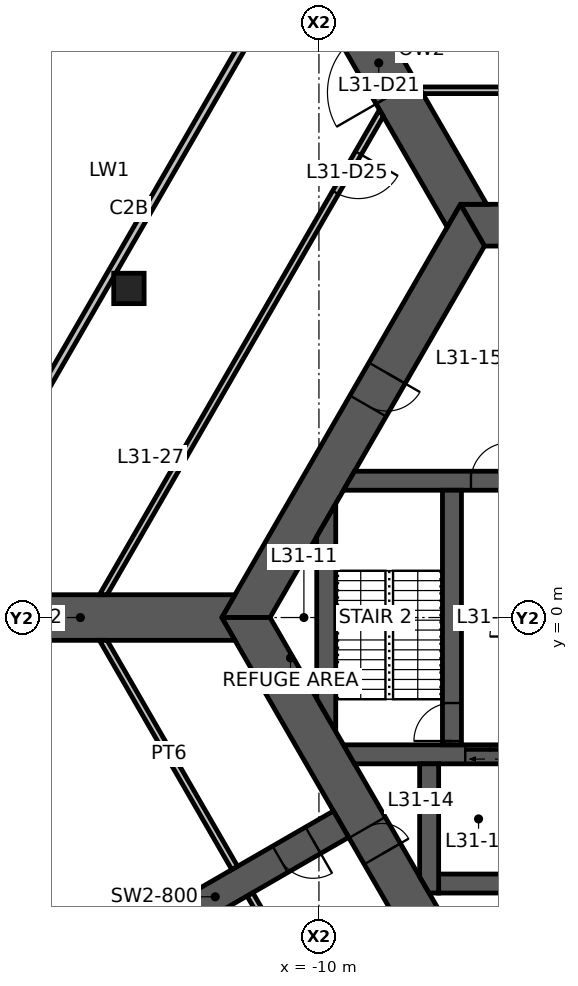
"""IFC4 building model, lengths in metres.
Left out: names, types, materials, properties, quantities, classifications, styles, units other than length and angle.
Written with IfcOpenShell. Run it as: python <this file> out.ifc"""

import sys

from ifc_helpers import new_model, si_unit, direction, frame, frame_2d, origin, origin_2d, place, context, subcontext, project, spatial, polyline, rectangle, hollow_rectangle, outline, extrude, element, fill, save


model = new_model("IFC4")
c1 = context("Model", 3, precision=1e-05, world=origin(), true_north=direction((0.0, 1.0)))
c2 = subcontext(c1, "Body", "Model", "MODEL_VIEW")
j1 = project(units=[si_unit("LENGTHUNIT", "METRE"), si_unit("PLANEANGLEUNIT", "RADIAN")], contexts=[c1])
p1 = place(None, origin())
s1 = spatial("IfcSite", under=j1, at=p1, CompositionType="ELEMENT")
p2 = place(p1, origin())
s2 = spatial("IfcBuilding", under=s1, at=p2, CompositionType="ELEMENT")
p3 = place(p2, frame((0.0, 0.0, 123.6)))
s3 = spatial("IfcBuildingStorey", under=s2, at=p3, CompositionType="ELEMENT", Elevation=123.6)
p4 = place(p3, frame((-15.0, 8.66, 0.0), z_axis=(0.0, 0.0, 1.0), x_axis=(1.0, 0.0, 0.0)))
e1 = element("IfcColumn", 1, at=p4, inside=s3, PredefinedType="COLUMN", context=c2, shape_type="SweptSolid", body=[
    extrude(hollow_rectangle(XDim=0.8, YDim=0.8, WallThickness=0.045, at=origin_2d()), origin(), (0.0, 0.0, 1.0), 5.0),
])
p5 = place(p3, frame((5.961, 10.325, 0.0), z_axis=(0.0, 0.0, 1.0), x_axis=(-1.0, 0.0, 0.0)))
e2 = element("IfcWall", 2, at=p5, inside=s3, PredefinedType="SHEAR", context=c2, shape_type="SweptSolid", body=[
    extrude(outline(polyline([(-0.318, -0.55), (4.636, -0.55), (5.536, -0.55), (6.386, -0.55), (7.286, -0.55), (12.24, -0.55), (11.605, 0.55), (7.286, 0.55), (6.386, 0.55), (5.536, 0.55), (4.636, 0.55), (0.318, 0.55), (-0.318, -0.55)])), origin(), (0.0, 0.0, 1.0), 5.0),
])
p6 = place(p5, frame((6.386, 0.0, 0.0)))
e3 = element("IfcOpeningElement", 3, at=p6, cuts=e2, PredefinedType="OPENING", context=c2, shape_type="SweptSolid", body=[
    extrude(rectangle(XDim=0.9, YDim=2.1, at=frame_2d((0.45, 1.05))), frame((0.0, 0.56, 0.0), z_axis=(0.0, -1.0, 0.0), x_axis=(1.0, 0.0, 0.0)), (0.0, 0.0, 1.0), 1.12),
])
p7 = place(p5, frame((4.636, 0.0, 0.0)))
e4 = element("IfcOpeningElement", 4, at=p7, cuts=e2, PredefinedType="OPENING", context=c2, shape_type="SweptSolid", body=[
    extrude(rectangle(XDim=0.9, YDim=2.1, at=frame_2d((0.45, 1.05))), frame((0.0, 0.56, 0.0), z_axis=(0.0, -1.0, 0.0), x_axis=(1.0, 0.0, 0.0)), (0.0, 0.0, 1.0), 1.12),
])
p8 = place(p3, frame((-5.961, 10.325, 0.0), z_axis=(0.0, 0.0, 1.0), x_axis=(-0.500004296715, -0.866022923061, 0.0)))
e5 = element("IfcWall", 5, at=p8, inside=s3, PredefinedType="SHEAR", context=c2, shape_type="SweptSolid", body=[
    extrude(outline(polyline([(-0.318, -0.55), (4.494, -0.55), (5.494, -0.55), (12.24, -0.55), (11.605, 0.55), (5.494, 0.55), (4.494, 0.55), (0.318, 0.55), (-0.318, -0.55)])), origin(), (0.0, 0.0, 1.0), 5.0),
])
p9 = place(p8, frame((4.494, 0.0, 0.0)))
e6 = element("IfcOpeningElement", 6, at=p9, cuts=e5, PredefinedType="OPENING", context=c2, shape_type="SweptSolid", body=[
    extrude(rectangle(XDim=1.0, YDim=2.1, at=frame_2d((0.5, 1.05))), frame((0.0, 0.56, 0.0), z_axis=(0.0, -1.0, 0.0), x_axis=(1.0, 0.0, 0.0)), (0.0, 0.0, 1.0), 1.12),
])
p10 = place(p3, frame((-11.922, 0.0, 0.0), z_axis=(0.0, 0.0, 1.0), x_axis=(0.500004296715, -0.866022923061, 0.0)))
e7 = element("IfcWall", 7, at=p10, inside=s3, PredefinedType="SHEAR", context=c2, shape_type="SweptSolid", body=[
    extrude(outline(polyline([(-0.318, -0.55), (6.381, -0.55), (7.181, -0.55), (12.24, -0.55), (11.605, 0.55), (7.181, 0.55), (6.381, 0.55), (0.318, 0.55), (-0.318, -0.55)])), origin(), (0.0, 0.0, 1.0), 5.0),
])
p11 = place(p10, frame((6.381, 0.0, 0.0)))
e8 = element("IfcOpeningElement", 8, at=p11, cuts=e7, PredefinedType="OPENING", context=c2, shape_type="SweptSolid", body=[
    extrude(rectangle(XDim=0.8, YDim=2.1, at=frame_2d((0.4, 1.05))), frame((0.0, 0.56, 0.0), z_axis=(0.0, -1.0, 0.0), x_axis=(1.0, 0.0, 0.0)), (0.0, 0.0, 1.0), 1.12),
])
p12 = place(p3, frame((-9.418, -5.438, 0.0), z_axis=(0.0, 0.0, 1.0), x_axis=(-0.866029782078, -0.499992416496, 0.0)))
e9 = element("IfcWall", 9, at=p12, inside=s3, PredefinedType="SHEAR", context=c2, shape_type="SweptSolid", body=[
    extrude(rectangle(XDim=7.646, YDim=0.8, at=frame_2d((3.823, 0.0))), origin(), (0.0, 0.0, 1.0), 5.0),
])
p13 = place(p12, frame((0.85, 0.0, 0.0)))
e10 = element("IfcOpeningElement", 10, at=p13, cuts=e9, PredefinedType="OPENING", context=c2, shape_type="SweptSolid", body=[
    extrude(rectangle(XDim=1.0, YDim=2.1, at=frame_2d((0.5, 1.05))), frame((0.0, 0.41, 0.0), z_axis=(0.0, -1.0, 0.0), x_axis=(1.0, 0.0, 0.0)), (0.0, 0.0, 1.0), 0.82),
])
p14 = place(p3, frame((-6.279, 10.875, -1.15), z_axis=(0.0, 0.0, 1.0), x_axis=(-0.50000923905, 0.866020069551, 0.0)))
e11 = element("IfcWall", 11, at=p14, inside=s3, PredefinedType="SHEAR", context=c2, shape_type="SweptSolid", body=[
    extrude(outline(polyline([(-0.346, -0.6), (3.395, -0.6), (5.195, -0.6), (7.443, -0.6), (7.443, 0.6), (5.195, 0.6), (3.395, 0.6), (-0.346, 0.6), (0.0, 0.0), (-0.346, -0.6)])), origin(), (0.0, 0.0, 1.0), 6.15),
])
p15 = place(p14, frame((3.395, 0.0, 1.15)))
e12 = element("IfcOpeningElement", 12, at=p15, cuts=e11, PredefinedType="OPENING", context=c2, shape_type="SweptSolid", body=[
    extrude(rectangle(XDim=1.8, YDim=2.4, at=frame_2d((0.9, 1.2))), frame((0.0, 0.61, 0.0), z_axis=(0.0, -1.0, 0.0), x_axis=(1.0, 0.0, 0.0)), (0.0, 0.0, 1.0), 1.22),
])
p16 = place(p3, frame((-12.557, 0.0, -1.15), z_axis=(0.0, 0.0, 1.0), x_axis=(-1.0, 0.0, 0.0)))
e13 = element("IfcWall", 13, at=p16, inside=s3, PredefinedType="SHEAR", context=c2, shape_type="SweptSolid", body=[
    extrude(outline(polyline([(-0.346, -0.6), (7.443, -0.6), (7.443, 0.6), (-0.346, 0.6), (0.0, 0.0), (-0.346, -0.6)])), origin(), (0.0, 0.0, 1.0), 6.15),
])
p17 = place(p3, frame((-10.65, 17.395, 0.0), z_axis=(0.0, 0.0, 1.0), x_axis=(-0.499999841607, -0.866025495233, 0.0)))
e14 = element("IfcWall", 14, at=p17, inside=s3, PredefinedType="ELEMENTEDWALL", context=c2, shape_type="SweptSolid", body=[
    extrude(rectangle(XDim=19.479, YDim=0.2, at=frame_2d((9.739, 0.0))), origin(), (0.0, 0.0, 1.0), 5.0),
])
p18 = place(p3, frame((-9.209, 3.6, 0.0), z_axis=(0.0, 0.0, 1.0), x_axis=(1.0, 0.0, 0.0)))
e15 = element("IfcWall", 15, at=p18, inside=s3, PredefinedType="SHEAR", context=c2, shape_type="SweptSolid", body=[
    extrude(outline(polyline([(-0.144, -0.25), (3.209, -0.25), (4.209, -0.25), (7.859, -0.25), (7.859, 0.25), (4.209, 0.25), (3.209, 0.25), (0.144, 0.25), (-0.144, -0.25)])), origin(), (0.0, 0.0, 1.0), 5.0),
])
p19 = place(p18, frame((3.209, 0.0, 0.0)))
e16 = element("IfcOpeningElement", 16, at=p19, cuts=e15, PredefinedType="OPENING", context=c2, shape_type="SweptSolid", body=[
    extrude(rectangle(XDim=1.0, YDim=2.1, at=frame_2d((0.5, 1.05))), frame((0.0, 0.26, 0.0), z_axis=(0.0, -1.0, 0.0), x_axis=(1.0, 0.0, 0.0)), (0.0, 0.0, 1.0), 0.52),
])
p20 = place(p3, frame((-9.209, -3.6, 0.0), z_axis=(0.0, 0.0, 1.0), x_axis=(1.0, 0.0, 0.0)))
e17 = element("IfcWall", 17, at=p20, inside=s3, PredefinedType="SHEAR", context=c2, shape_type="SweptSolid", body=[
    extrude(outline(polyline([(0.144, -0.25), (3.059, -0.25), (4.359, -0.25), (7.859, -0.25), (7.859, 0.25), (4.359, 0.25), (3.059, 0.25), (-0.144, 0.25), (0.144, -0.25)])), origin(), (0.0, 0.0, 1.0), 5.0),
])
p21 = place(p20, frame((3.059, 0.0, 0.0)))
e18 = element("IfcOpeningElement", 18, at=p21, cuts=e17, PredefinedType="OPENING", context=c2, shape_type="SweptSolid", body=[
    extrude(rectangle(XDim=1.3, YDim=2.1, at=frame_2d((0.65, 1.05))), frame((0.0, 0.26, 0.0), z_axis=(0.0, -1.0, 0.0), x_axis=(1.0, 0.0, 0.0)), (0.0, 0.0, 1.0), 0.52),
])
p22 = place(p3, frame((-6.5, -3.35, 0.0), z_axis=(0.0, 0.0, 1.0), x_axis=(0.0, 1.0, 0.0)))
e19 = element("IfcWall", 19, at=p22, inside=s3, PredefinedType="SHEAR", context=c2, shape_type="SweptSolid", body=[
    extrude(rectangle(XDim=6.7, YDim=0.5, at=frame_2d((3.35, 0.0))), origin(), (0.0, 0.0, 1.0), 5.0),
])
p23 = place(p22, frame((0.1, 0.0, 0.0)))
e20 = element("IfcOpeningElement", 20, at=p23, cuts=e19, PredefinedType="OPENING", context=c2, shape_type="SweptSolid", body=[
    extrude(rectangle(XDim=1.0, YDim=2.1, at=frame_2d((0.5, 1.05))), frame((0.0, 0.26, 0.0), z_axis=(0.0, -1.0, 0.0), x_axis=(1.0, 0.0, 0.0)), (0.0, 0.0, 1.0), 0.52),
])
p24 = place(p3, frame((-6.85, -7.0, 0.0), z_axis=(0.0, 0.0, 1.0), x_axis=(1.0, 0.0, 0.0)))
e21 = element("IfcWall", 21, at=p24, inside=s3, PredefinedType="SHEAR", context=c2, shape_type="SweptSolid", body=[
    extrude(rectangle(XDim=2.1, YDim=0.5, at=frame_2d((1.05, 0.0))), origin(), (0.0, 0.0, 1.0), 5.0),
])
p25 = place(p3, frame((-7.1, -3.85, 0.0), z_axis=(0.0, 0.0, 1.0), x_axis=(0.0, -1.0, 0.0)))
e22 = element("IfcWall", 22, at=p25, inside=s3, PredefinedType="SHEAR", context=c2, shape_type="SweptSolid", body=[
    extrude(outline(polyline([(0.0, -0.25), (2.969, -0.25), (3.4, 0.0), (3.4, 0.25), (0.0, 0.25), (0.0, -0.25)])), origin(), (0.0, 0.0, 1.0), 5.0),
])
p26 = place(p3, frame((-9.808, -2.562, 0.0), z_axis=(0.0, 0.0, 1.0), x_axis=(0.0, 1.0, 0.0)))
e23 = element("IfcWall", 23, at=p26, inside=s3, PredefinedType="SHEAR", context=c2, shape_type="SweptSolid", body=[
    extrude(outline(polyline([(-0.433, -0.25), (5.558, -0.25), (4.691, 0.25), (0.433, 0.25), (-0.433, -0.25)])), origin(), (0.0, 0.0, 1.0), 5.0),
])
p27 = place(p3, frame((-0.405, 13.875, 0.0), z_axis=(0.0, 0.0, 1.0), x_axis=(-1.0, 0.0, 0.0)))
e24 = element("IfcWall", 24, at=p27, inside=s3, PredefinedType="PARTITIONING", context=c2, shape_type="SweptSolid", body=[
    extrude(outline(polyline([(0.0, -0.087), (1.9, -0.087), (3.1, -0.087), (6.963, -0.087), (6.862, 0.087), (3.1, 0.087), (1.9, 0.087), (0.0, 0.087), (0.0, -0.087)])), origin(), (0.0, 0.0, 1.0), 4.8),
])
p28 = place(p27, frame((1.9, 0.0, 0.0)))
e25 = element("IfcOpeningElement", 25, at=p28, cuts=e24, PredefinedType="OPENING", context=c2, shape_type="SweptSolid", body=[
    extrude(rectangle(XDim=1.2, YDim=2.1, at=frame_2d((0.6, 1.05))), frame((0.0, 0.098, 0.0), z_axis=(0.0, -1.0, 0.0), x_axis=(1.0, 0.0, 0.0)), (0.0, 0.0, 1.0), 0.195),
])
p29 = place(p3, frame((-8.357, 13.275, 0.0), z_axis=(0.0, 0.0, 1.0), x_axis=(-0.500003545903, -0.866023356546, 0.0)))
e26 = element("IfcWall", 26, at=p29, inside=s3, PredefinedType="PARTITIONING", context=c2, shape_type="SweptSolid", body=[
    extrude(outline(polyline([(-0.051, -0.087), (1.213, -0.087), (2.413, -0.087), (14.686, -0.087), (14.585, 0.087), (2.413, 0.087), (1.213, 0.087), (0.051, 0.087), (-0.051, -0.087)])), origin(), (0.0, 0.0, 1.0), 4.8),
])
p30 = place(p29, frame((1.213, 0.0, 0.0)))
e27 = element("IfcOpeningElement", 27, at=p30, cuts=e26, PredefinedType="OPENING", context=c2, shape_type="SweptSolid", body=[
    extrude(rectangle(XDim=1.2, YDim=2.1, at=frame_2d((0.6, 1.05))), frame((0.0, 0.098, 0.0), z_axis=(0.0, -1.0, 0.0), x_axis=(1.0, 0.0, 0.0)), (0.0, 0.0, 1.0), 0.195),
])
p31 = place(p3, frame((-15.675, -0.6, 0.0), z_axis=(0.0, 0.0, 1.0), x_axis=(0.500005739714, -0.866022089933, 0.0)))
e28 = element("IfcWall", 28, at=p31, inside=s3, PredefinedType="PARTITIONING", context=c2, shape_type="SweptSolid", body=[
    extrude(outline(polyline([(-0.051, -0.087), (6.913, -0.087), (6.913, 0.087), (0.051, 0.087), (-0.051, -0.087)])), origin(), (0.0, 0.0, 1.0), 4.8),
])
p32 = place(p3, frame((-11.814, -7.288, 0.0), z_axis=(0.0, 0.0, 1.0), x_axis=(0.500005739714, -0.866022089933, 0.0)))
e29 = element("IfcWall", 29, at=p32, inside=s3, PredefinedType="PARTITIONING", context=c2, shape_type="SweptSolid", body=[
    extrude(outline(polyline([(0.0, -0.087), (1.9, -0.087), (3.1, -0.087), (6.964, -0.087), (6.863, 0.087), (3.1, 0.087), (1.9, 0.087), (0.0, 0.087), (0.0, -0.087)])), origin(), (0.0, 0.0, 1.0), 4.8),
])
p33 = place(p32, frame((1.9, 0.0, 0.0)))
e30 = element("IfcOpeningElement", 30, at=p33, cuts=e29, PredefinedType="OPENING", context=c2, shape_type="SweptSolid", body=[
    extrude(rectangle(XDim=1.2, YDim=2.1, at=frame_2d((0.6, 1.05))), frame((0.0, 0.098, 0.0), z_axis=(0.0, -1.0, 0.0), x_axis=(1.0, 0.0, 0.0)), (0.0, 0.0, 1.0), 0.195),
])
p34 = place(p11, origin())
e31 = element("IfcDoor", 31, at=p34, inside=s3, OperationType="SINGLE_SWING_RIGHT", PredefinedType="DOOR", context=c2, shape_type="SweptSolid", body=[
    extrude(rectangle(XDim=0.8, YDim=2.1, at=frame_2d((0.4, 1.05))), frame((0.0, 0.025, 0.0), z_axis=(0.0, -1.0, 0.0), x_axis=(1.0, 0.0, 0.0)), (0.0, 0.0, 1.0), 0.05),
])
fill(e8, e31)
p35 = place(p9, origin())
e32 = element("IfcDoor", 32, at=p35, inside=s3, OperationType="SINGLE_SWING_LEFT", PredefinedType="DOOR", context=c2, shape_type="SweptSolid", body=[
    extrude(rectangle(XDim=1.0, YDim=2.1, at=frame_2d((0.5, 1.05))), frame((0.0, 0.025, 0.0), z_axis=(0.0, -1.0, 0.0), x_axis=(1.0, 0.0, 0.0)), (0.0, 0.0, 1.0), 0.05),
])
fill(e6, e32)
p36 = place(p23, origin())
e33 = element("IfcDoor", 33, at=p36, inside=s3, OperationType="SINGLE_SWING_LEFT", PredefinedType="DOOR", context=c2, shape_type="SweptSolid", body=[
    extrude(rectangle(XDim=1.0, YDim=2.1, at=frame_2d((0.5, 1.05))), frame((0.0, 0.025, 0.0), z_axis=(0.0, -1.0, 0.0), x_axis=(1.0, 0.0, 0.0)), (0.0, 0.0, 1.0), 0.05),
])
fill(e20, e33)
p37 = place(p19, origin())
e34 = element("IfcDoor", 34, at=p37, inside=s3, OperationType="SINGLE_SWING_RIGHT", PredefinedType="DOOR", context=c2, shape_type="SweptSolid", body=[
    extrude(rectangle(XDim=1.0, YDim=2.1, at=frame_2d((0.5, 1.05))), frame((0.0, 0.025, 0.0), z_axis=(0.0, -1.0, 0.0), x_axis=(1.0, 0.0, 0.0)), (0.0, 0.0, 1.0), 0.05),
])
fill(e16, e34)
p38 = place(p13, origin())
e35 = element("IfcDoor", 35, at=p38, inside=s3, OperationType="SINGLE_SWING_LEFT", PredefinedType="DOOR", context=c2, shape_type="SweptSolid", body=[
    extrude(rectangle(XDim=1.0, YDim=2.1, at=frame_2d((0.5, 1.05))), frame((0.0, 0.025, 0.0), z_axis=(0.0, -1.0, 0.0), x_axis=(1.0, 0.0, 0.0)), (0.0, 0.0, 1.0), 0.05),
])
fill(e10, e35)
p39 = place(p15, origin())
e36 = element("IfcDoor", 36, at=p39, inside=s3, OperationType="DOUBLE_DOOR_SINGLE_SWING", PredefinedType="DOOR", context=c2, shape_type="SweptSolid", body=[
    extrude(rectangle(XDim=1.8, YDim=2.4, at=frame_2d((0.9, 1.2))), frame((0.0, 0.025, 0.0), z_axis=(0.0, -1.0, 0.0), x_axis=(1.0, 0.0, 0.0)), (0.0, 0.0, 1.0), 0.05),
])
fill(e12, e36)
p40 = place(p30, origin())
e37 = element("IfcDoor", 37, at=p40, inside=s3, OperationType="DOUBLE_DOOR_SINGLE_SWING", PredefinedType="DOOR", context=c2, shape_type="SweptSolid", body=[
    extrude(rectangle(XDim=1.2, YDim=2.1, at=frame_2d((0.6, 1.05))), frame((0.0, 0.025, 0.0), z_axis=(0.0, -1.0, 0.0), x_axis=(1.0, 0.0, 0.0)), (0.0, 0.0, 1.0), 0.05),
])
fill(e27, e37)
p41 = place(p21, origin())
e38 = element("IfcDoor", 38, at=p41, inside=s3, OperationType="DOUBLE_DOOR_SLIDING", PredefinedType="DOOR", context=c2, shape_type="SweptSolid", body=[
    extrude(rectangle(XDim=1.3, YDim=2.1, at=frame_2d((0.65, 1.05))), frame((0.0, 0.025, 0.0), z_axis=(0.0, -1.0, 0.0), x_axis=(1.0, 0.0, 0.0)), (0.0, 0.0, 1.0), 0.05),
])
fill(e18, e38)
save(model, sys.argv[1])
